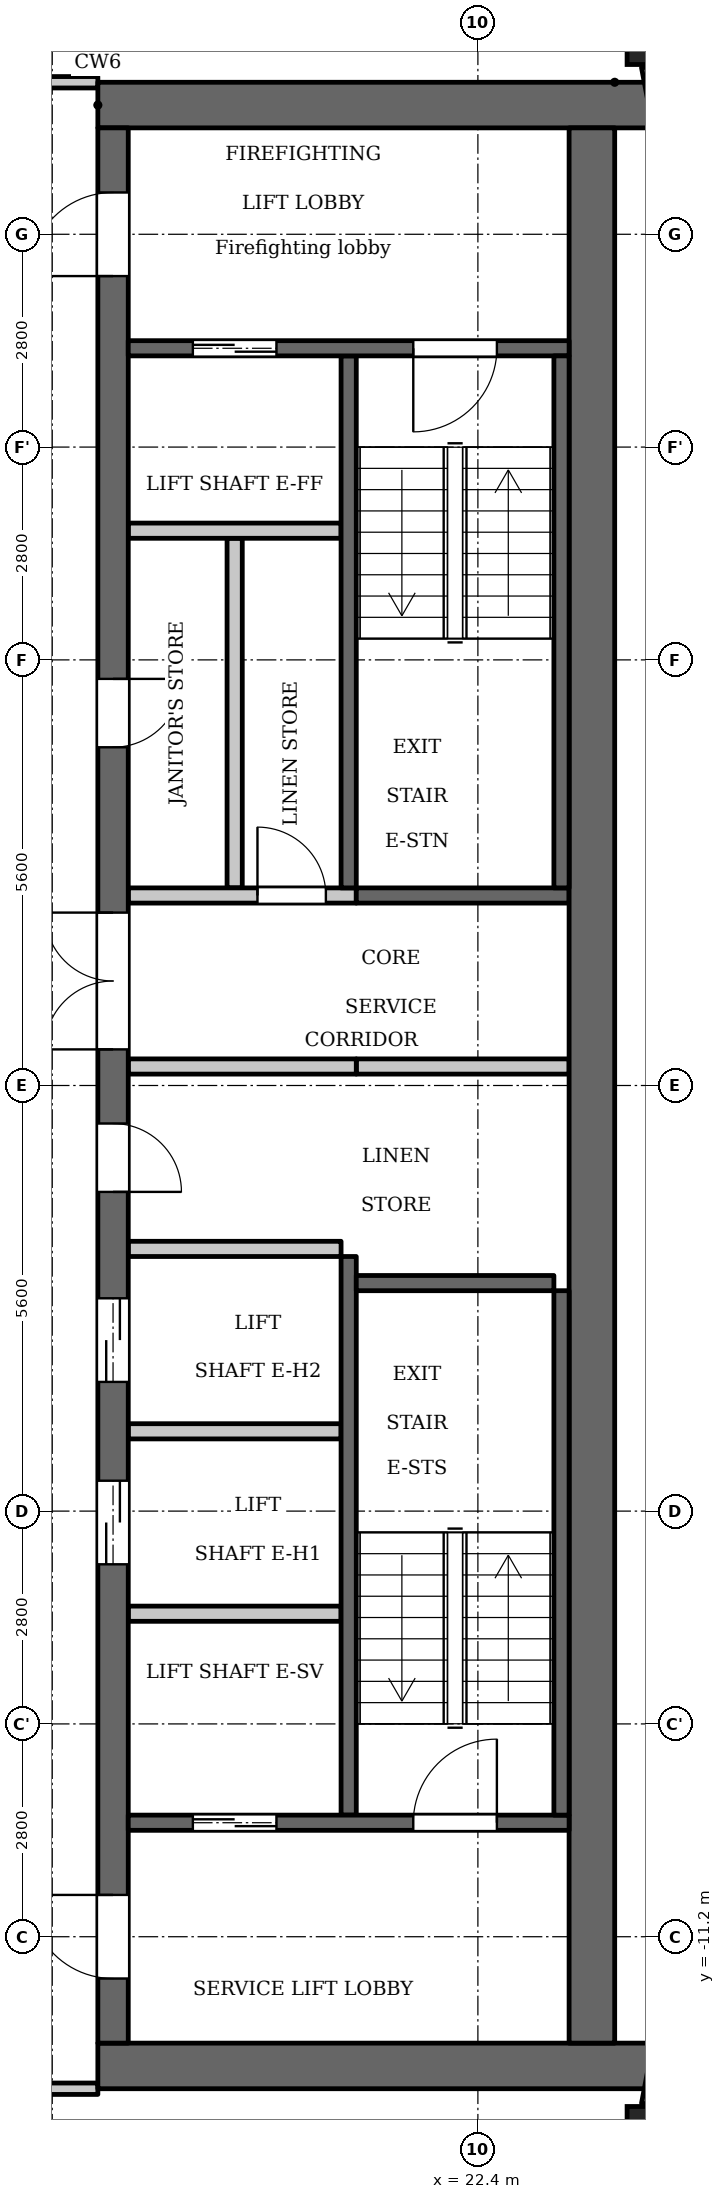
"""IFC4 building model, lengths in metres.
Left out: names, types, materials, properties, quantities, classifications, styles, units other than length and angle.
Written with IfcOpenShell. Run it as: python <this file> out.ifc"""

import sys

from ifc_helpers import new_model, si_unit, direction, frame, frame_2d, origin, origin_2d, place, context, subcontext, project, spatial, rectangle, extrude, element, fill, save


model = new_model("IFC4")
c1 = context("Model", 3, precision=1e-05, world=origin(), true_north=direction((0.0, 1.0)))
c2 = subcontext(c1, "Body", "Model", "MODEL_VIEW")
j1 = project(units=[si_unit("LENGTHUNIT", "METRE"), si_unit("PLANEANGLEUNIT", "RADIAN")], contexts=[c1])
p1 = place(None, origin())
s1 = spatial("IfcSite", under=j1, at=p1, CompositionType="ELEMENT")
p2 = place(p1, origin())
s2 = spatial("IfcBuilding", under=s1, at=p2, CompositionType="ELEMENT")
p3 = place(p2, frame((0.0, 0.0, 276.7)))
s3 = spatial("IfcBuildingStorey", under=s2, at=p3, CompositionType="ELEMENT", Elevation=276.7)
for number, where, z_axis, x_axis in (
    (1, (24.738, -13.809, 0.0), (0.0, 0.0, 1.0), (1.0, 0.0, 0.0)),
    (2, (24.738, 13.809, 0.0), (0.0, 0.0, 1.0), (1.0, 0.0, 0.0)),
):
    element("IfcColumn", number, at=place(p3, frame(where, z_axis=z_axis, x_axis=x_axis)), inside=s3, PredefinedType="COLUMN", context=c2, shape_type="SweptSolid", body=[
        extrude(rectangle(XDim=0.75, YDim=0.75, at=origin_2d()), origin(), (0.0, 0.0, 1.0), 3.5),
    ])
for number, where, z_axis, x_axis in (
    (3, (24.7, -13.42, 0.0), (0.0, 0.0, 1.0), (0.187, 0.982, 0.0)),
    (4, (25.053, 11.572, 0.0), (0.0, 0.0, 1.0), (-0.187, 0.982, 0.0)),
):
    element("IfcWall", number, at=place(p3, frame(where, z_axis=z_axis, x_axis=x_axis)), inside=s3, PredefinedType="SOLIDWALL", context=c2, shape_type="SweptSolid", body=[
        extrude(rectangle(XDim=1.881, YDim=0.3, at=frame_2d((0.941, 0.0))), origin(), (0.0, 0.0, 1.0), 2.55),
    ])
p4 = place(p3, frame((20.7, 2.6, 0.0), z_axis=(0.0, 0.0, 1.0), x_axis=(0.0, 1.0, 0.0)))
e5 = element("IfcWall", 5, at=p4, inside=s3, PredefinedType="SHEAR", context=c2, shape_type="SweptSolid", body=[
    extrude(rectangle(XDim=7.0, YDim=0.2, at=frame_2d((3.5, 0.0))), origin(), (0.0, 0.0, 1.0), 3.2),
])
p5 = place(p3, frame((20.7, -9.6, 0.0), z_axis=(0.0, 0.0, 1.0), x_axis=(0.0, 1.0, 0.0)))
e6 = element("IfcWall", 6, at=p5, inside=s3, PredefinedType="SHEAR", context=c2, shape_type="SweptSolid", body=[
    extrude(rectangle(XDim=7.35, YDim=0.2, at=frame_2d((3.675, 0.0))), origin(), (0.0, 0.0, 1.0), 3.2),
])
p6 = place(p3, frame((20.8, 2.5, 0.0), z_axis=(0.0, 0.0, 1.0), x_axis=(1.0, 0.0, 0.0)))
e7 = element("IfcWall", 7, at=p6, inside=s3, PredefinedType="SHEAR", context=c2, shape_type="SweptSolid", body=[
    extrude(rectangle(XDim=2.8, YDim=0.2, at=frame_2d((1.4, 0.0))), origin(), (0.0, 0.0, 1.0), 3.2),
])
p7 = place(p3, frame((20.8, 0.25, 0.0), z_axis=(0.0, 0.0, 1.0), x_axis=(1.0, 0.0, 0.0)))
e8 = element("IfcWall", 8, at=p7, inside=s3, PredefinedType="PARTITIONING", context=c2, shape_type="SweptSolid", body=[
    extrude(rectangle(XDim=2.8, YDim=0.2, at=frame_2d((1.4, 0.0))), origin(), (0.0, 0.0, 1.0), 3.2),
])
for number, where, z_axis, x_axis in (
    (9, (17.4, 12.9, 0.0), (0.0, 0.0, 1.0), (1.0, 0.0, 0.0)),
    (10, (17.4, -12.9, 0.0), (0.0, 0.0, 1.0), (1.0, 0.0, 0.0)),
):
    element("IfcWall", number, at=place(p3, frame(where, z_axis=z_axis, x_axis=x_axis)), inside=s3, PredefinedType="SHEAR", context=c2, shape_type="SweptSolid", body=[
        extrude(rectangle(XDim=7.32, YDim=0.6, at=frame_2d((3.66, 0.0))), origin(), (0.0, 0.0, 1.0), 3.2),
    ])
p8 = place(p3, frame((19.2, 2.6, 0.0), z_axis=(0.0, 0.0, 1.0), x_axis=(0.0, 1.0, 0.0)))
e11 = element("IfcWall", 11, at=p8, inside=s3, PredefinedType="PARTITIONING", context=c2, shape_type="SweptSolid", body=[
    extrude(rectangle(XDim=4.6, YDim=0.2, at=frame_2d((2.3, 0.0))), origin(), (0.0, 0.0, 1.0), 3.2),
])
p9 = place(p3, frame((17.6, -12.6, 0.0), z_axis=(0.0, 0.0, 1.0), x_axis=(0.0, 1.0, 0.0)))
e12 = element("IfcWall", 12, at=p9, inside=s3, PredefinedType="SHEAR", context=c2, shape_type="SweptSolid", body=[
    extrude(rectangle(XDim=25.2, YDim=0.4, at=frame_2d((12.6, 0.0))), origin(), (0.0, 0.0, 1.0), 3.2),
])
p10 = place(p9, frame((6.3, 0.0, 0.0)))
e13 = element("IfcOpeningElement", 13, at=p10, cuts=e12, PredefinedType="OPENING", context=c2, shape_type="SweptSolid", body=[
    extrude(rectangle(XDim=1.1, YDim=2.1, at=frame_2d((0.55, 1.05))), frame((0.0, 0.21, 0.0), z_axis=(0.0, -1.0, 0.0), x_axis=(1.0, 0.0, 0.0)), (0.0, 0.0, 1.0), 0.42),
])
p11 = place(p9, frame((8.7, 0.0, 0.0)))
e14 = element("IfcOpeningElement", 14, at=p11, cuts=e12, PredefinedType="OPENING", context=c2, shape_type="SweptSolid", body=[
    extrude(rectangle(XDim=1.1, YDim=2.1, at=frame_2d((0.55, 1.05))), frame((0.0, 0.21, 0.0), z_axis=(0.0, -1.0, 0.0), x_axis=(1.0, 0.0, 0.0)), (0.0, 0.0, 1.0), 0.42),
])
p12 = place(p9, frame((11.2, 0.0, 0.0)))
e15 = element("IfcOpeningElement", 15, at=p12, cuts=e12, PredefinedType="OPENING", context=c2, shape_type="SweptSolid", body=[
    extrude(rectangle(XDim=0.9, YDim=2.1, at=frame_2d((0.45, 1.05))), frame((0.0, 0.21, 0.0), z_axis=(0.0, -1.0, 0.0), x_axis=(1.0, 0.0, 0.0)), (0.0, 0.0, 1.0), 0.42),
])
p13 = place(p9, frame((17.05, 0.0, 0.0)))
e16 = element("IfcOpeningElement", 16, at=p13, cuts=e12, PredefinedType="OPENING", context=c2, shape_type="SweptSolid", body=[
    extrude(rectangle(XDim=0.9, YDim=2.1, at=frame_2d((0.45, 1.05))), frame((0.0, 0.21, 0.0), z_axis=(0.0, -1.0, 0.0), x_axis=(1.0, 0.0, 0.0)), (0.0, 0.0, 1.0), 0.42),
])
p14 = place(p9, frame((23.25, 0.0, 0.0)))
e17 = element("IfcOpeningElement", 17, at=p14, cuts=e12, PredefinedType="OPENING", context=c2, shape_type="SweptSolid", body=[
    extrude(rectangle(XDim=1.1, YDim=2.1, at=frame_2d((0.55, 1.05))), frame((0.0, 0.21, 0.0), z_axis=(0.0, -1.0, 0.0), x_axis=(1.0, 0.0, 0.0)), (0.0, 0.0, 1.0), 0.42),
])
p15 = place(p9, frame((0.85, 0.0, 0.0)))
e18 = element("IfcOpeningElement", 18, at=p15, cuts=e12, PredefinedType="OPENING", context=c2, shape_type="SweptSolid", body=[
    extrude(rectangle(XDim=1.1, YDim=2.1, at=frame_2d((0.55, 1.05))), frame((0.0, 0.21, 0.0), z_axis=(0.0, -1.0, 0.0), x_axis=(1.0, 0.0, 0.0)), (0.0, 0.0, 1.0), 0.42),
])
p16 = place(p9, frame((13.075, 0.0, 0.0)))
e19 = element("IfcOpeningElement", 19, at=p16, cuts=e12, PredefinedType="OPENING", context=c2, shape_type="SweptSolid", body=[
    extrude(rectangle(XDim=1.8, YDim=2.1, at=frame_2d((0.9, 1.05))), frame((0.0, 0.21, 0.0), z_axis=(0.0, -1.0, 0.0), x_axis=(1.0, 0.0, 0.0)), (0.0, 0.0, 1.0), 0.42),
])
p17 = place(p3, frame((23.9, -12.6, 0.0), z_axis=(0.0, 0.0, 1.0), x_axis=(0.0, 1.0, 0.0)))
e20 = element("IfcWall", 20, at=p17, inside=s3, PredefinedType="SHEAR", context=c2, shape_type="SweptSolid", body=[
    extrude(rectangle(XDim=25.2, YDim=0.6, at=frame_2d((12.6, 0.0))), origin(), (0.0, 0.0, 1.0), 3.2),
])
p18 = place(p3, frame((17.8, -9.7, 0.0), z_axis=(0.0, 0.0, 1.0), x_axis=(1.0, 0.0, 0.0)))
e21 = element("IfcWall", 21, at=p18, inside=s3, PredefinedType="SHEAR", context=c2, shape_type="SweptSolid", body=[
    extrude(rectangle(XDim=5.8, YDim=0.2, at=frame_2d((2.9, 0.0))), origin(), (0.0, 0.0, 1.0), 3.2),
])
p19 = place(p18, frame((0.85, 0.0, 0.0)))
e22 = element("IfcOpeningElement", 22, at=p19, cuts=e21, PredefinedType="OPENING", context=c2, shape_type="SweptSolid", body=[
    extrude(rectangle(XDim=1.1, YDim=2.1, at=frame_2d((0.55, 1.05))), frame((0.0, 0.11, 0.0), z_axis=(0.0, -1.0, 0.0), x_axis=(1.0, 0.0, 0.0)), (0.0, 0.0, 1.0), 0.22),
])
p20 = place(p18, frame((3.75, 0.0, 0.0)))
e23 = element("IfcOpeningElement", 23, at=p20, cuts=e21, PredefinedType="OPENING", context=c2, shape_type="SweptSolid", body=[
    extrude(rectangle(XDim=1.1, YDim=2.1, at=frame_2d((0.55, 1.05))), frame((0.0, 0.11, 0.0), z_axis=(0.0, -1.0, 0.0), x_axis=(1.0, 0.0, 0.0)), (0.0, 0.0, 1.0), 0.22),
])
for number, where, z_axis, x_axis in (
    (24, (17.8, -6.95, 0.0), (0.0, 0.0, 1.0), (1.0, 0.0, 0.0)),
    (25, (17.8, -4.55, 0.0), (0.0, 0.0, 1.0), (1.0, 0.0, 0.0)),
    (26, (17.8, -2.15, 0.0), (0.0, 0.0, 1.0), (1.0, 0.0, 0.0)),
):
    element("IfcWall", number, at=place(p3, frame(where, z_axis=z_axis, x_axis=x_axis)), inside=s3, PredefinedType="PARTITIONING", context=c2, shape_type="SweptSolid", body=[
        extrude(rectangle(XDim=2.8, YDim=0.2, at=frame_2d((1.4, 0.0))), origin(), (0.0, 0.0, 1.0), 3.2),
    ])
p21 = place(p3, frame((17.8, 0.25, 0.0), z_axis=(0.0, 0.0, 1.0), x_axis=(1.0, 0.0, 0.0)))
e27 = element("IfcWall", 27, at=p21, inside=s3, PredefinedType="PARTITIONING", context=c2, shape_type="SweptSolid", body=[
    extrude(rectangle(XDim=3.0, YDim=0.2, at=frame_2d((1.5, 0.0))), origin(), (0.0, 0.0, 1.0), 3.2),
])
p22 = place(p3, frame((17.8, 2.5, 0.0), z_axis=(0.0, 0.0, 1.0), x_axis=(1.0, 0.0, 0.0)))
e28 = element("IfcWall", 28, at=p22, inside=s3, PredefinedType="PARTITIONING", context=c2, shape_type="SweptSolid", body=[
    extrude(rectangle(XDim=3.0, YDim=0.2, at=frame_2d((1.5, 0.0))), origin(), (0.0, 0.0, 1.0), 3.2),
])
p23 = place(p22, frame((1.7, 0.0, 0.0)))
e29 = element("IfcOpeningElement", 29, at=p23, cuts=e28, PredefinedType="OPENING", context=c2, shape_type="SweptSolid", body=[
    extrude(rectangle(XDim=0.9, YDim=2.1, at=frame_2d((0.45, 1.05))), frame((0.0, 0.11, 0.0), z_axis=(0.0, -1.0, 0.0), x_axis=(1.0, 0.0, 0.0)), (0.0, 0.0, 1.0), 0.22),
])
p24 = place(p3, frame((17.8, 7.3, 0.0), z_axis=(0.0, 0.0, 1.0), x_axis=(1.0, 0.0, 0.0)))
e30 = element("IfcWall", 30, at=p24, inside=s3, PredefinedType="PARTITIONING", context=c2, shape_type="SweptSolid", body=[
    extrude(rectangle(XDim=2.8, YDim=0.2, at=frame_2d((1.4, 0.0))), origin(), (0.0, 0.0, 1.0), 3.2),
])
p25 = place(p3, frame((17.8, 9.7, 0.0), z_axis=(0.0, 0.0, 1.0), x_axis=(1.0, 0.0, 0.0)))
e31 = element("IfcWall", 31, at=p25, inside=s3, PredefinedType="SHEAR", context=c2, shape_type="SweptSolid", body=[
    extrude(rectangle(XDim=5.8, YDim=0.2, at=frame_2d((2.9, 0.0))), origin(), (0.0, 0.0, 1.0), 3.2),
])
p26 = place(p25, frame((0.85, 0.0, 0.0)))
e32 = element("IfcOpeningElement", 32, at=p26, cuts=e31, PredefinedType="OPENING", context=c2, shape_type="SweptSolid", body=[
    extrude(rectangle(XDim=1.1, YDim=2.1, at=frame_2d((0.55, 1.05))), frame((0.0, 0.11, 0.0), z_axis=(0.0, -1.0, 0.0), x_axis=(1.0, 0.0, 0.0)), (0.0, 0.0, 1.0), 0.22),
])
p27 = place(p25, frame((3.75, 0.0, 0.0)))
e33 = element("IfcOpeningElement", 33, at=p27, cuts=e31, PredefinedType="OPENING", context=c2, shape_type="SweptSolid", body=[
    extrude(rectangle(XDim=1.1, YDim=2.1, at=frame_2d((0.55, 1.05))), frame((0.0, 0.11, 0.0), z_axis=(0.0, -1.0, 0.0), x_axis=(1.0, 0.0, 0.0)), (0.0, 0.0, 1.0), 0.22),
])
p28 = place(p3, frame((23.5, 2.6, 0.0), z_axis=(0.0, 0.0, 1.0), x_axis=(0.0, 1.0, 0.0)))
e34 = element("IfcWall", 34, at=p28, inside=s3, PredefinedType="SHEAR", context=c2, shape_type="SweptSolid", body=[
    extrude(rectangle(XDim=7.0, YDim=0.2, at=frame_2d((3.5, 0.0))), origin(), (0.0, 0.0, 1.0), 3.2),
])
p29 = place(p3, frame((23.5, -9.6, 0.0), z_axis=(0.0, 0.0, 1.0), x_axis=(0.0, 1.0, 0.0)))
e35 = element("IfcWall", 35, at=p29, inside=s3, PredefinedType="SHEAR", context=c2, shape_type="SweptSolid", body=[
    extrude(rectangle(XDim=6.9, YDim=0.2, at=frame_2d((3.45, 0.0))), origin(), (0.0, 0.0, 1.0), 3.2),
])
p30 = place(p3, frame((20.8, -2.6, 0.0), z_axis=(0.0, 0.0, 1.0), x_axis=(1.0, 0.0, 0.0)))
e36 = element("IfcWall", 36, at=p30, inside=s3, PredefinedType="SHEAR", context=c2, shape_type="SweptSolid", body=[
    extrude(rectangle(XDim=2.6, YDim=0.2, at=frame_2d((1.3, 0.0))), origin(), (0.0, 0.0, 1.0), 3.2),
])
p31 = place(p3, frame((15.075, -13.2, 0.0), z_axis=(0.0, 0.0, 1.0), x_axis=(1.0, 0.0, 0.0)))
e37 = element("IfcWall", 37, at=p31, inside=s3, PredefinedType="PARTITIONING", context=c2, shape_type="SweptSolid", body=[
    extrude(rectangle(XDim=2.325, YDim=0.15, at=frame_2d((1.163, 0.0))), origin(), (0.0, 0.0, 1.0), 3.2),
])
p32 = place(p31, frame((0.575, 0.0, 0.0)))
e38 = element("IfcOpeningElement", 38, at=p32, cuts=e37, PredefinedType="OPENING", context=c2, shape_type="SweptSolid", body=[
    extrude(rectangle(XDim=1.0, YDim=2.1, at=frame_2d((0.5, 1.05))), frame((0.0, 0.085, 0.0), z_axis=(0.0, -1.0, 0.0), x_axis=(1.0, 0.0, 0.0)), (0.0, 0.0, 1.0), 0.17),
])
p33 = place(p3, frame((15.075, 13.2, 0.0), z_axis=(0.0, 0.0, 1.0), x_axis=(1.0, 0.0, 0.0)))
e39 = element("IfcWall", 39, at=p33, inside=s3, PredefinedType="PARTITIONING", context=c2, shape_type="SweptSolid", body=[
    extrude(rectangle(XDim=2.325, YDim=0.15, at=frame_2d((1.163, 0.0))), origin(), (0.0, 0.0, 1.0), 3.2),
])
p34 = place(p33, frame((0.675, 0.0, 0.0)))
e40 = element("IfcOpeningElement", 40, at=p34, cuts=e39, PredefinedType="OPENING", context=c2, shape_type="SweptSolid", body=[
    extrude(rectangle(XDim=1.0, YDim=2.1, at=frame_2d((0.5, 1.05))), frame((0.0, 0.085, 0.0), z_axis=(0.0, -1.0, 0.0), x_axis=(1.0, 0.0, 0.0)), (0.0, 0.0, 1.0), 0.17),
])
p35 = place(p19, origin())
e41 = element("IfcDoor", 41, at=p35, inside=s3, OperationType="DOUBLE_DOOR_SLIDING", PredefinedType="DOOR", context=c2, shape_type="SweptSolid", body=[
    extrude(rectangle(XDim=1.1, YDim=2.1, at=frame_2d((0.55, 1.05))), frame((0.0, 0.025, 0.0), z_axis=(0.0, -1.0, 0.0), x_axis=(1.0, 0.0, 0.0)), (0.0, 0.0, 1.0), 0.05),
])
fill(e22, e41)
p36 = place(p10, origin())
e42 = element("IfcDoor", 42, at=p36, inside=s3, OperationType="DOUBLE_DOOR_SLIDING", PredefinedType="DOOR", context=c2, shape_type="SweptSolid", body=[
    extrude(rectangle(XDim=1.1, YDim=2.1, at=frame_2d((0.55, 1.05))), frame((0.0, 0.025, 0.0), z_axis=(0.0, -1.0, 0.0), x_axis=(1.0, 0.0, 0.0)), (0.0, 0.0, 1.0), 0.05),
])
fill(e13, e42)
p37 = place(p11, origin())
e43 = element("IfcDoor", 43, at=p37, inside=s3, OperationType="DOUBLE_DOOR_SLIDING", PredefinedType="DOOR", context=c2, shape_type="SweptSolid", body=[
    extrude(rectangle(XDim=1.1, YDim=2.1, at=frame_2d((0.55, 1.05))), frame((0.0, 0.025, 0.0), z_axis=(0.0, -1.0, 0.0), x_axis=(1.0, 0.0, 0.0)), (0.0, 0.0, 1.0), 0.05),
])
fill(e14, e43)
p38 = place(p12, origin())
e44 = element("IfcDoor", 44, at=p38, inside=s3, OperationType="SINGLE_SWING_LEFT", PredefinedType="DOOR", context=c2, shape_type="SweptSolid", body=[
    extrude(rectangle(XDim=0.9, YDim=2.1, at=frame_2d((0.45, 1.05))), frame((0.0, 0.025, 0.0), z_axis=(0.0, -1.0, 0.0), x_axis=(1.0, 0.0, 0.0)), (0.0, 0.0, 1.0), 0.05),
])
fill(e15, e44)
p39 = place(p13, origin())
e45 = element("IfcDoor", 45, at=p39, inside=s3, OperationType="SINGLE_SWING_RIGHT", PredefinedType="DOOR", context=c2, shape_type="SweptSolid", body=[
    extrude(rectangle(XDim=0.9, YDim=2.1, at=frame_2d((0.45, 1.05))), frame((0.0, 0.025, 0.0), z_axis=(0.0, -1.0, 0.0), x_axis=(1.0, 0.0, 0.0)), (0.0, 0.0, 1.0), 0.05),
])
fill(e16, e45)
p40 = place(p23, origin())
e46 = element("IfcDoor", 46, at=p40, inside=s3, OperationType="SINGLE_SWING_RIGHT", PredefinedType="DOOR", context=c2, shape_type="SweptSolid", body=[
    extrude(rectangle(XDim=0.9, YDim=2.1, at=frame_2d((0.45, 1.05))), frame((0.0, 0.025, 0.0), z_axis=(0.0, -1.0, 0.0), x_axis=(1.0, 0.0, 0.0)), (0.0, 0.0, 1.0), 0.05),
])
fill(e29, e46)
p41 = place(p26, origin())
e47 = element("IfcDoor", 47, at=p41, inside=s3, OperationType="DOUBLE_DOOR_SLIDING", PredefinedType="DOOR", context=c2, shape_type="SweptSolid", body=[
    extrude(rectangle(XDim=1.1, YDim=2.1, at=frame_2d((0.55, 1.05))), frame((0.0, 0.025, 0.0), z_axis=(0.0, -1.0, 0.0), x_axis=(1.0, 0.0, 0.0)), (0.0, 0.0, 1.0), 0.05),
])
fill(e32, e47)
p42 = place(p14, origin())
e48 = element("IfcDoor", 48, at=p42, inside=s3, OperationType="SINGLE_SWING_RIGHT", PredefinedType="DOOR", context=c2, shape_type="SweptSolid", body=[
    extrude(rectangle(XDim=1.1, YDim=2.1, at=frame_2d((0.55, 1.05))), frame((0.0, 0.025, 0.0), z_axis=(0.0, -1.0, 0.0), x_axis=(1.0, 0.0, 0.0)), (0.0, 0.0, 1.0), 0.05),
])
fill(e17, e48)
p43 = place(p15, origin())
e49 = element("IfcDoor", 49, at=p43, inside=s3, OperationType="SINGLE_SWING_LEFT", PredefinedType="DOOR", context=c2, shape_type="SweptSolid", body=[
    extrude(rectangle(XDim=1.1, YDim=2.1, at=frame_2d((0.55, 1.05))), frame((0.0, 0.025, 0.0), z_axis=(0.0, -1.0, 0.0), x_axis=(1.0, 0.0, 0.0)), (0.0, 0.0, 1.0), 0.05),
])
fill(e18, e49)
p44 = place(p27, origin())
e50 = element("IfcDoor", 50, at=p44, inside=s3, OperationType="SINGLE_SWING_LEFT", PredefinedType="DOOR", context=c2, shape_type="SweptSolid", body=[
    extrude(rectangle(XDim=1.1, YDim=2.1, at=frame_2d((0.55, 1.05))), frame((0.0, 0.025, 0.0), z_axis=(0.0, -1.0, 0.0), x_axis=(1.0, 0.0, 0.0)), (0.0, 0.0, 1.0), 0.05),
])
fill(e33, e50)
p45 = place(p20, origin())
e51 = element("IfcDoor", 51, at=p45, inside=s3, OperationType="SINGLE_SWING_LEFT", PredefinedType="DOOR", context=c2, shape_type="SweptSolid", body=[
    extrude(rectangle(XDim=1.1, YDim=2.1, at=frame_2d((0.55, 1.05))), frame((0.0, 0.025, 0.0), z_axis=(0.0, -1.0, 0.0), x_axis=(1.0, 0.0, 0.0)), (0.0, 0.0, 1.0), 0.05),
])
fill(e23, e51)
p46 = place(p16, origin())
e52 = element("IfcDoor", 52, at=p46, inside=s3, OperationType="DOUBLE_DOOR_SINGLE_SWING", PredefinedType="DOOR", context=c2, shape_type="SweptSolid", body=[
    extrude(rectangle(XDim=1.8, YDim=2.1, at=frame_2d((0.9, 1.05))), frame((0.0, 0.025, 0.0), z_axis=(0.0, -1.0, 0.0), x_axis=(1.0, 0.0, 0.0)), (0.0, 0.0, 1.0), 0.05),
])
fill(e19, e52)
save(model, sys.argv[1])
